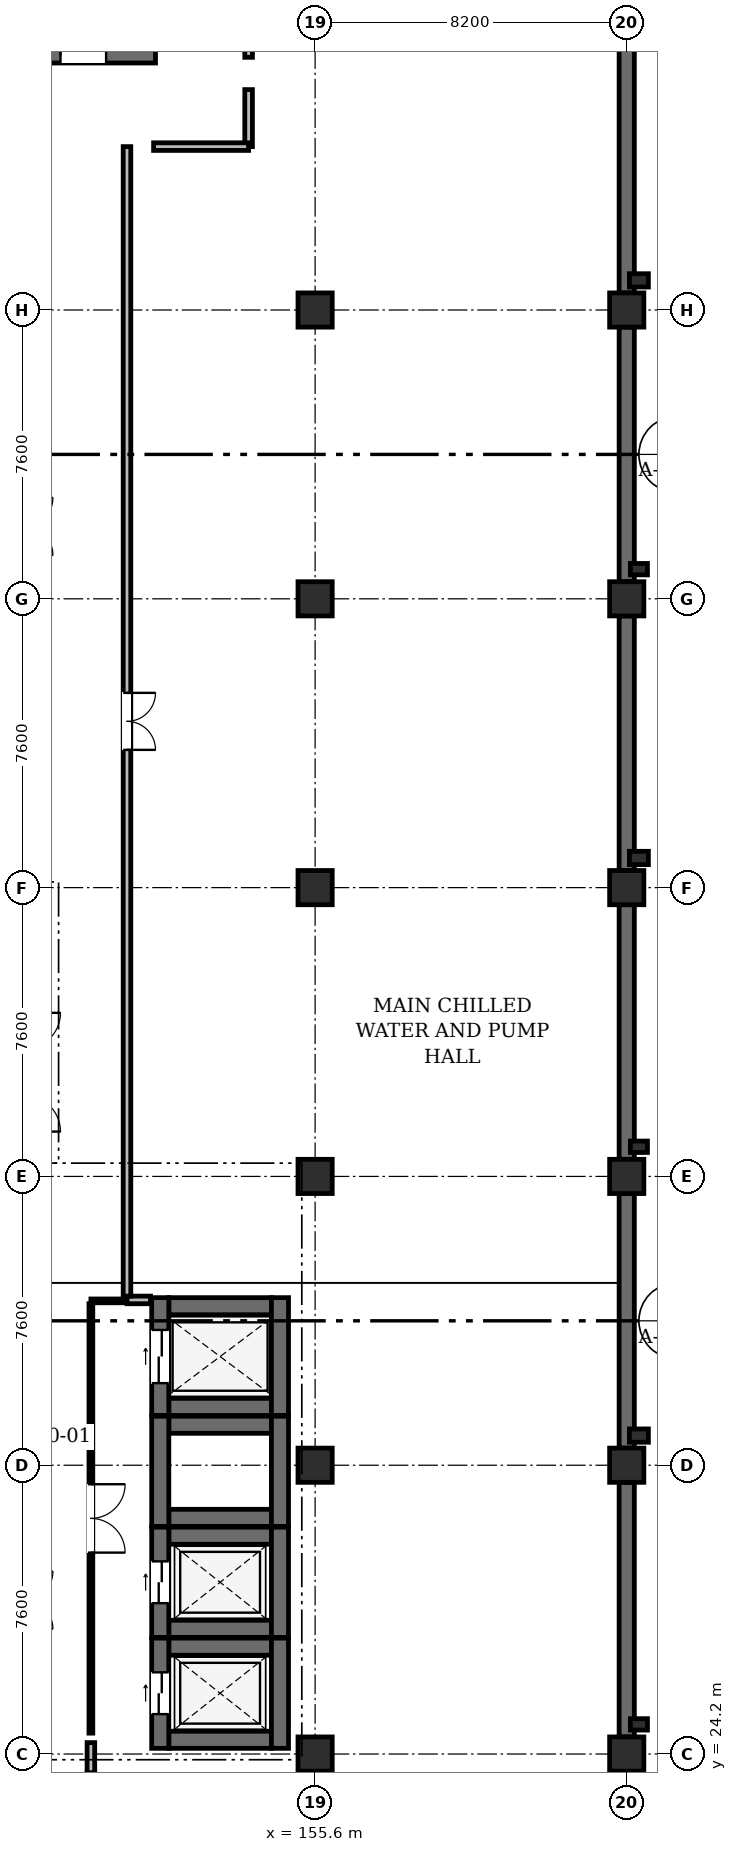
"""IFC4 building model, lengths in metres.
Left out: names, types, materials, properties, quantities, classifications, styles, units other than length and angle.
Written with IfcOpenShell. Run it as: python <this file> out.ifc"""

import sys

from ifc_helpers import new_model, si_unit, direction, frame, frame_2d, origin, origin_2d, place, context, subcontext, project, spatial, rectangle, extrude, element, fill, save


model = new_model("IFC4")
c1 = context("Model", 3, precision=1e-05, world=origin(), true_north=direction((0.0, 1.0)))
c2 = subcontext(c1, "Body", "Model", "MODEL_VIEW")
j1 = project(units=[si_unit("LENGTHUNIT", "METRE"), si_unit("PLANEANGLEUNIT", "RADIAN")], contexts=[c1])
p1 = place(None, origin())
s1 = spatial("IfcSite", under=j1, at=p1, CompositionType="ELEMENT")
p2 = place(p1, origin())
s2 = spatial("IfcBuilding", under=s1, at=p2, CompositionType="ELEMENT")
p3 = place(p2, frame((0.0, 0.0, -4.8)))
s3 = spatial("IfcBuildingStorey", under=s2, at=p3, CompositionType="ELEMENT", Elevation=-4.8)
for number, where, z_axis, x_axis in (
    (1, (155.6, 24.2, 0.0), (0.0, 0.0, 1.0), (1.0, 0.0, 0.0)),
    (2, (155.6, 31.8, 0.0), (0.0, 0.0, 1.0), (1.0, 0.0, 0.0)),
    (3, (155.6, 39.4, 0.0), (0.0, 0.0, 1.0), (1.0, 0.0, 0.0)),
    (4, (155.6, 47.0, 0.0), (0.0, 0.0, 1.0), (1.0, 0.0, 0.0)),
    (5, (155.6, 54.6, 0.0), (0.0, 0.0, 1.0), (1.0, 0.0, 0.0)),
    (6, (155.6, 62.2, 0.0), (0.0, 0.0, 1.0), (1.0, 0.0, 0.0)),
    (7, (163.8, 24.2, 0.0), (0.0, 0.0, 1.0), (1.0, 0.0, 0.0)),
    (8, (163.8, 31.8, 0.0), (0.0, 0.0, 1.0), (1.0, 0.0, 0.0)),
    (9, (163.8, 39.4, 0.0), (0.0, 0.0, 1.0), (1.0, 0.0, 0.0)),
    (10, (163.8, 47.0, 0.0), (0.0, 0.0, 1.0), (1.0, 0.0, 0.0)),
    (11, (163.8, 54.6, 0.0), (0.0, 0.0, 1.0), (1.0, 0.0, 0.0)),
    (12, (163.8, 62.2, 0.0), (0.0, 0.0, 1.0), (1.0, 0.0, 0.0)),
):
    element("IfcColumn", number, at=place(p3, frame(where, z_axis=z_axis, x_axis=x_axis)), inside=s3, PredefinedType="COLUMN", context=c2, shape_type="SweptSolid", body=[
        extrude(rectangle(XDim=0.9, YDim=0.9, at=origin_2d()), origin(), (0.0, 0.0, 1.0), 4.46),
    ])
p4 = place(p3, frame((164.12, 24.98, 0.0), z_axis=(0.0, 0.0, 1.0), x_axis=(1.0, 0.0, 0.0)))
e13 = element("IfcColumn", 13, at=p4, inside=s3, PredefinedType="PILASTER", context=c2, shape_type="SweptSolid", body=[
    extrude(rectangle(XDim=0.45, YDim=0.3, at=origin_2d()), origin(), (0.0, 0.0, 1.0), 4.565),
])
p5 = place(p3, frame((164.12, 32.58, 0.0), z_axis=(0.0, 0.0, 1.0), x_axis=(1.0, 0.0, 0.0)))
e14 = element("IfcColumn", 14, at=p5, inside=s3, PredefinedType="PILASTER", context=c2, shape_type="SweptSolid", body=[
    extrude(rectangle(XDim=0.5, YDim=0.35, at=origin_2d()), origin(), (0.0, 0.0, 1.0), 4.565),
])
p6 = place(p3, frame((164.12, 40.18, 0.0), z_axis=(0.0, 0.0, 1.0), x_axis=(1.0, 0.0, 0.0)))
e15 = element("IfcColumn", 15, at=p6, inside=s3, PredefinedType="PILASTER", context=c2, shape_type="SweptSolid", body=[
    extrude(rectangle(XDim=0.45, YDim=0.3, at=origin_2d()), origin(), (0.0, 0.0, 1.0), 4.565),
])
p7 = place(p3, frame((164.12, 47.78, 0.0), z_axis=(0.0, 0.0, 1.0), x_axis=(1.0, 0.0, 0.0)))
e16 = element("IfcColumn", 16, at=p7, inside=s3, PredefinedType="PILASTER", context=c2, shape_type="SweptSolid", body=[
    extrude(rectangle(XDim=0.5, YDim=0.35, at=origin_2d()), origin(), (0.0, 0.0, 1.0), 4.565),
])
p8 = place(p3, frame((164.12, 55.38, 0.0), z_axis=(0.0, 0.0, 1.0), x_axis=(1.0, 0.0, 0.0)))
e17 = element("IfcColumn", 17, at=p8, inside=s3, PredefinedType="PILASTER", context=c2, shape_type="SweptSolid", body=[
    extrude(rectangle(XDim=0.45, YDim=0.3, at=origin_2d()), origin(), (0.0, 0.0, 1.0), 4.565),
])
p9 = place(p3, frame((164.12, 62.98, 0.0), z_axis=(0.0, 0.0, 1.0), x_axis=(1.0, 0.0, 0.0)))
e18 = element("IfcColumn", 18, at=p9, inside=s3, PredefinedType="PILASTER", context=c2, shape_type="SweptSolid", body=[
    extrude(rectangle(XDim=0.5, YDim=0.35, at=origin_2d()), origin(), (0.0, 0.0, 1.0), 4.565),
])
p10 = place(p3, frame((163.8, 17.05, 0.0), z_axis=(0.0, 0.0, 1.0), x_axis=(0.0, 1.0, 0.0)))
e19 = element("IfcWall", 19, at=p10, inside=s3, PredefinedType="SOLIDWALL", context=c2, shape_type="SweptSolid", body=[
    extrude(rectangle(XDim=6.7, YDim=0.4, at=frame_2d((3.35, 0.0))), origin(), (0.0, 0.0, 1.0), 4.46),
])
p11 = place(p3, frame((163.8, 24.65, 0.0), z_axis=(0.0, 0.0, 1.0), x_axis=(0.0, 1.0, 0.0)))
e20 = element("IfcWall", 20, at=p11, inside=s3, PredefinedType="SOLIDWALL", context=c2, shape_type="SweptSolid", body=[
    extrude(rectangle(XDim=6.7, YDim=0.4, at=frame_2d((3.35, 0.0))), origin(), (0.0, 0.0, 1.0), 4.46),
])
for number, where, z_axis, x_axis in (
    (21, (163.8, 32.25, 0.0), (0.0, 0.0, 1.0), (0.0, 1.0, 0.0)),
    (22, (163.8, 39.85, 0.0), (0.0, 0.0, 1.0), (0.0, 1.0, 0.0)),
    (23, (163.8, 47.45, 0.0), (0.0, 0.0, 1.0), (0.0, 1.0, 0.0)),
    (24, (163.8, 55.05, 0.0), (0.0, 0.0, 1.0), (0.0, 1.0, 0.0)),
):
    element("IfcWall", number, at=place(p3, frame(where, z_axis=z_axis, x_axis=x_axis)), inside=s3, PredefinedType="SOLIDWALL", context=c2, shape_type="SweptSolid", body=[
        extrude(rectangle(XDim=6.7, YDim=0.4, at=frame_2d((3.35, 0.0))), origin(), (0.0, 0.0, 1.0), 4.46),
    ])
p12 = place(p3, frame((163.8, 62.65, 0.0), z_axis=(0.0, 0.0, 1.0), x_axis=(0.0, 1.0, 0.0)))
e25 = element("IfcWall", 25, at=p12, inside=s3, PredefinedType="SOLIDWALL", context=c2, shape_type="SweptSolid", body=[
    extrude(rectangle(XDim=6.775, YDim=0.4, at=frame_2d((3.388, 0.0))), origin(), (0.0, 0.0, 1.0), 4.46),
])
p13 = place(p3, frame((147.6, 68.9, 0.0), z_axis=(0.0, 0.0, 1.0), x_axis=(1.0, 0.0, 0.0)))
e26 = element("IfcWall", 26, at=p13, inside=s3, PredefinedType="SHEAR", context=c2, shape_type="SweptSolid", body=[
    extrude(rectangle(XDim=3.8, YDim=0.4, at=frame_2d((1.9, 0.0))), origin(), (0.0, 0.0, 1.0), 4.46),
])
p14 = place(p13, frame((1.3, 0.0, 0.0)))
e27 = element("IfcOpeningElement", 27, at=p14, cuts=e26, PredefinedType="OPENING", context=c2, shape_type="SweptSolid", body=[
    extrude(rectangle(XDim=1.2, YDim=2.2, at=frame_2d((0.6, 1.1))), frame((0.0, 0.212, 0.0), z_axis=(0.0, -1.0, 0.0), x_axis=(1.0, 0.0, 0.0)), (0.0, 0.0, 1.0), 0.424),
])
for number, where, z_axis, x_axis in (
    (28, (151.75, 24.575, 0.0), (0.0, 0.0, 1.0), (1.0, 0.0, 0.0)),
    (29, (151.75, 27.025, 0.0), (0.0, 0.0, 1.0), (1.0, 0.0, 0.0)),
):
    element("IfcWall", number, at=place(p3, frame(where, z_axis=z_axis, x_axis=x_axis)), inside=s3, PredefinedType="SHEAR", context=c2, shape_type="SweptSolid", body=[
        extrude(rectangle(XDim=2.7, YDim=0.45, at=frame_2d((1.35, 0.0))), origin(), (0.0, 0.0, 1.0), 4.46),
    ])
p15 = place(p3, frame((151.525, 24.35, 0.0), z_axis=(0.0, 0.0, 1.0), x_axis=(0.0, 1.0, 0.0)))
e30 = element("IfcWall", 30, at=p15, inside=s3, PredefinedType="SHEAR", context=c2, shape_type="SweptSolid", body=[
    extrude(rectangle(XDim=2.9, YDim=0.45, at=frame_2d((1.45, 0.0))), origin(), (0.0, 0.0, 1.0), 4.46),
])
p16 = place(p15, frame((0.9, 0.0, 0.0)))
e31 = element("IfcOpeningElement", 31, at=p16, cuts=e30, PredefinedType="OPENING", context=c2, shape_type="SweptSolid", body=[
    extrude(rectangle(XDim=1.1, YDim=2.2, at=frame_2d((0.55, 1.1))), frame((0.0, 0.237, 0.0), z_axis=(0.0, -1.0, 0.0), x_axis=(1.0, 0.0, 0.0)), (0.0, 0.0, 1.0), 0.474),
])
p17 = place(p3, frame((154.675, 24.35, 0.0), z_axis=(0.0, 0.0, 1.0), x_axis=(0.0, 1.0, 0.0)))
e32 = element("IfcWall", 32, at=p17, inside=s3, PredefinedType="SHEAR", context=c2, shape_type="SweptSolid", body=[
    extrude(rectangle(XDim=2.9, YDim=0.45, at=frame_2d((1.45, 0.0))), origin(), (0.0, 0.0, 1.0), 4.46),
])
for number, where, z_axis, x_axis in (
    (33, (151.75, 27.495, 0.0), (0.0, 0.0, 1.0), (1.0, 0.0, 0.0)),
    (34, (151.75, 29.945, 0.0), (0.0, 0.0, 1.0), (1.0, 0.0, 0.0)),
):
    element("IfcWall", number, at=place(p3, frame(where, z_axis=z_axis, x_axis=x_axis)), inside=s3, PredefinedType="SHEAR", context=c2, shape_type="SweptSolid", body=[
        extrude(rectangle(XDim=2.7, YDim=0.45, at=frame_2d((1.35, 0.0))), origin(), (0.0, 0.0, 1.0), 4.46),
    ])
p18 = place(p3, frame((151.525, 27.27, 0.0), z_axis=(0.0, 0.0, 1.0), x_axis=(0.0, 1.0, 0.0)))
e35 = element("IfcWall", 35, at=p18, inside=s3, PredefinedType="SHEAR", context=c2, shape_type="SweptSolid", body=[
    extrude(rectangle(XDim=2.9, YDim=0.45, at=frame_2d((1.45, 0.0))), origin(), (0.0, 0.0, 1.0), 4.46),
])
p19 = place(p18, frame((0.9, 0.0, 0.0)))
e36 = element("IfcOpeningElement", 36, at=p19, cuts=e35, PredefinedType="OPENING", context=c2, shape_type="SweptSolid", body=[
    extrude(rectangle(XDim=1.1, YDim=2.2, at=frame_2d((0.55, 1.1))), frame((0.0, 0.237, 0.0), z_axis=(0.0, -1.0, 0.0), x_axis=(1.0, 0.0, 0.0)), (0.0, 0.0, 1.0), 0.474),
])
p20 = place(p3, frame((154.675, 27.27, 0.0), z_axis=(0.0, 0.0, 1.0), x_axis=(0.0, 1.0, 0.0)))
e37 = element("IfcWall", 37, at=p20, inside=s3, PredefinedType="SHEAR", context=c2, shape_type="SweptSolid", body=[
    extrude(rectangle(XDim=2.9, YDim=0.45, at=frame_2d((1.45, 0.0))), origin(), (0.0, 0.0, 1.0), 4.46),
])
for number, where, z_axis, x_axis in (
    (38, (151.75, 30.415, 0.0), (0.0, 0.0, 1.0), (1.0, 0.0, 0.0)),
    (39, (151.75, 32.865, 0.0), (0.0, 0.0, 1.0), (1.0, 0.0, 0.0)),
):
    element("IfcWall", number, at=place(p3, frame(where, z_axis=z_axis, x_axis=x_axis)), inside=s3, PredefinedType="SHEAR", context=c2, shape_type="SweptSolid", body=[
        extrude(rectangle(XDim=2.7, YDim=0.45, at=frame_2d((1.35, 0.0))), origin(), (0.0, 0.0, 1.0), 4.46),
    ])
for number, where, z_axis, x_axis in (
    (40, (151.525, 30.19, 0.0), (0.0, 0.0, 1.0), (0.0, 1.0, 0.0)),
    (41, (154.675, 30.19, 0.0), (0.0, 0.0, 1.0), (0.0, 1.0, 0.0)),
):
    element("IfcWall", number, at=place(p3, frame(where, z_axis=z_axis, x_axis=x_axis)), inside=s3, PredefinedType="SHEAR", context=c2, shape_type="SweptSolid", body=[
        extrude(rectangle(XDim=2.9, YDim=0.45, at=frame_2d((1.45, 0.0))), origin(), (0.0, 0.0, 1.0), 4.46),
    ])
for number, where, z_axis, x_axis in (
    (42, (151.75, 33.335, 0.0), (0.0, 0.0, 1.0), (1.0, 0.0, 0.0)),
    (43, (151.75, 35.985, 0.0), (0.0, 0.0, 1.0), (1.0, 0.0, 0.0)),
):
    element("IfcWall", number, at=place(p3, frame(where, z_axis=z_axis, x_axis=x_axis)), inside=s3, PredefinedType="SHEAR", context=c2, shape_type="SweptSolid", body=[
        extrude(rectangle(XDim=2.7, YDim=0.45, at=frame_2d((1.35, 0.0))), origin(), (0.0, 0.0, 1.0), 4.46),
    ])
p21 = place(p3, frame((151.525, 33.11, 0.0), z_axis=(0.0, 0.0, 1.0), x_axis=(0.0, 1.0, 0.0)))
e44 = element("IfcWall", 44, at=p21, inside=s3, PredefinedType="SHEAR", context=c2, shape_type="SweptSolid", body=[
    extrude(rectangle(XDim=3.1, YDim=0.45, at=frame_2d((1.55, 0.0))), origin(), (0.0, 0.0, 1.0), 4.46),
])
p22 = place(p21, frame((0.85, 0.0, 0.0)))
e45 = element("IfcOpeningElement", 45, at=p22, cuts=e44, PredefinedType="OPENING", context=c2, shape_type="SweptSolid", body=[
    extrude(rectangle(XDim=1.4, YDim=2.3, at=frame_2d((0.7, 1.15))), frame((0.0, 0.237, 0.0), z_axis=(0.0, -1.0, 0.0), x_axis=(1.0, 0.0, 0.0)), (0.0, 0.0, 1.0), 0.474),
])
p23 = place(p3, frame((154.675, 33.11, 0.0), z_axis=(0.0, 0.0, 1.0), x_axis=(0.0, 1.0, 0.0)))
e46 = element("IfcWall", 46, at=p23, inside=s3, PredefinedType="SHEAR", context=c2, shape_type="SweptSolid", body=[
    extrude(rectangle(XDim=3.1, YDim=0.45, at=frame_2d((1.55, 0.0))), origin(), (0.0, 0.0, 1.0), 4.46),
])
p24 = place(p3, frame((149.7, 24.75, 0.0), z_axis=(0.0, 0.0, 1.0), x_axis=(0.0, 1.0, 0.0)))
e47 = element("IfcWall", 47, at=p24, inside=s3, PredefinedType="PARTITIONING", context=c2, shape_type="SweptSolid", body=[
    extrude(rectangle(XDim=11.3, YDim=0.1, at=frame_2d((5.65, 0.0))), origin(), (0.0, 0.0, 1.0), 4.405),
])
p25 = place(p24, frame((4.75, 0.0, 0.0)))
e48 = element("IfcOpeningElement", 48, at=p25, cuts=e47, PredefinedType="OPENING", context=c2, shape_type="SweptSolid", body=[
    extrude(rectangle(XDim=1.8, YDim=2.4, at=frame_2d((0.9, 1.2))), frame((0.0, 0.062, 0.0), z_axis=(0.0, -1.0, 0.0), x_axis=(1.0, 0.0, 0.0)), (0.0, 0.0, 1.0), 0.124),
])
p26 = place(p3, frame((149.7, 36.125, 0.0), z_axis=(0.0, 0.0, 1.0), x_axis=(1.0, 0.0, 0.0)))
e49 = element("IfcWall", 49, at=p26, inside=s3, PredefinedType="PARTITIONING", context=c2, shape_type="SweptSolid", body=[
    extrude(rectangle(XDim=0.95, YDim=0.1, at=frame_2d((0.475, 0.0))), origin(), (0.0, 0.0, 1.0), 4.405),
])
p27 = place(p3, frame((150.65, 36.15, 0.0), z_axis=(0.0, 0.0, 1.0), x_axis=(1.0, 0.0, 0.0)))
e50 = element("IfcWall", 50, at=p27, inside=s3, PredefinedType="PARTITIONING", context=c2, shape_type="SweptSolid", body=[
    extrude(rectangle(XDim=0.62, YDim=0.2, at=frame_2d((0.31, 0.0))), origin(), (0.0, 0.0, 1.0), 4.405),
])
p28 = place(p3, frame((149.7, 24.5, 0.0), z_axis=(0.0, 0.0, 1.0), x_axis=(0.0, -1.0, 0.0)))
e51 = element("IfcWall", 51, at=p28, inside=s3, PredefinedType="PARTITIONING", context=c2, shape_type="SweptSolid", body=[
    extrude(rectangle(XDim=0.8, YDim=0.2, at=frame_2d((0.4, 0.0))), origin(), (0.0, 0.0, 1.0), 4.405),
])
p29 = place(p3, frame((153.85, 68.0, 0.0), z_axis=(0.0, 0.0, 1.0), x_axis=(0.0, -1.0, 0.0)))
e52 = element("IfcWall", 52, at=p29, inside=s3, PredefinedType="PARTITIONING", context=c2, shape_type="SweptSolid", body=[
    extrude(rectangle(XDim=1.5, YDim=0.2, at=frame_2d((0.75, 0.0))), origin(), (0.0, 0.0, 1.0), 4.405),
])
p30 = place(p3, frame((153.85, 66.5, 0.0), z_axis=(0.0, 0.0, 1.0), x_axis=(-1.0, 0.0, 0.0)))
e53 = element("IfcWall", 53, at=p30, inside=s3, PredefinedType="PARTITIONING", context=c2, shape_type="SweptSolid", body=[
    extrude(rectangle(XDim=2.5, YDim=0.2, at=frame_2d((1.25, 0.0))), origin(), (0.0, 0.0, 1.0), 4.405),
])
p31 = place(p3, frame((150.65, 66.5, 0.0), z_axis=(0.0, 0.0, 1.0), x_axis=(0.0, -1.0, 0.0)))
e54 = element("IfcWall", 54, at=p31, inside=s3, PredefinedType="PARTITIONING", context=c2, shape_type="SweptSolid", body=[
    extrude(rectangle(XDim=30.25, YDim=0.2, at=frame_2d((15.125, 0.0))), origin(), (0.0, 0.0, 1.0), 4.405),
])
p32 = place(p31, frame((14.375, 0.0, 0.0)))
e55 = element("IfcOpeningElement", 55, at=p32, cuts=e54, PredefinedType="OPENING", context=c2, shape_type="SweptSolid", body=[
    extrude(rectangle(XDim=1.5, YDim=2.2, at=frame_2d((0.75, 1.1))), frame((0.0, 0.112, 0.0), z_axis=(0.0, -1.0, 0.0), x_axis=(1.0, 0.0, 0.0)), (0.0, 0.0, 1.0), 0.224),
])
p33 = place(p3, frame((153.85, 99.9, 0.0), z_axis=(0.0, 0.0, 1.0), x_axis=(0.0, -1.0, 0.0)))
e56 = element("IfcWall", 56, at=p33, inside=s3, PredefinedType="PARTITIONING", context=c2, shape_type="SweptSolid", body=[
    extrude(rectangle(XDim=31.05, YDim=0.2, at=frame_2d((15.525, 0.0))), origin(), (0.0, 0.0, 1.0), 4.405),
])
p34 = place(p33, frame((14.775, 0.0, 0.0)))
e57 = element("IfcOpeningElement", 57, at=p34, cuts=e56, PredefinedType="OPENING", context=c2, shape_type="SweptSolid", body=[
    extrude(rectangle(XDim=1.5, YDim=2.2, at=frame_2d((0.75, 1.1))), frame((0.0, 0.112, 0.0), z_axis=(0.0, -1.0, 0.0), x_axis=(1.0, 0.0, 0.0)), (0.0, 0.0, 1.0), 0.224),
])
p35 = place(p14, origin())
e58 = element("IfcDoor", 58, at=p35, inside=s3, OperationType="SINGLE_SWING_LEFT", PredefinedType="DOOR", context=c2, shape_type="SweptSolid", body=[
    extrude(rectangle(XDim=1.2, YDim=2.2, at=frame_2d((0.6, 1.1))), frame((0.0, 0.025, 0.0), z_axis=(0.0, -1.0, 0.0), x_axis=(1.0, 0.0, 0.0)), (0.0, 0.0, 1.0), 0.05),
])
fill(e27, e58)
p36 = place(p16, origin())
e59 = element("IfcDoor", 59, at=p36, inside=s3, OperationType="DOUBLE_DOOR_SLIDING", PredefinedType="DOOR", context=c2, shape_type="SweptSolid", body=[
    extrude(rectangle(XDim=1.1, YDim=2.2, at=frame_2d((0.55, 1.1))), frame((0.0, 0.025, 0.0), z_axis=(0.0, -1.0, 0.0), x_axis=(1.0, 0.0, 0.0)), (0.0, 0.0, 1.0), 0.05),
])
fill(e31, e59)
p37 = place(p19, origin())
e60 = element("IfcDoor", 60, at=p37, inside=s3, OperationType="DOUBLE_DOOR_SLIDING", PredefinedType="DOOR", context=c2, shape_type="SweptSolid", body=[
    extrude(rectangle(XDim=1.1, YDim=2.2, at=frame_2d((0.55, 1.1))), frame((0.0, 0.025, 0.0), z_axis=(0.0, -1.0, 0.0), x_axis=(1.0, 0.0, 0.0)), (0.0, 0.0, 1.0), 0.05),
])
fill(e36, e60)
p38 = place(p22, origin())
e61 = element("IfcDoor", 61, at=p38, inside=s3, OperationType="DOUBLE_DOOR_SLIDING", PredefinedType="DOOR", context=c2, shape_type="SweptSolid", body=[
    extrude(rectangle(XDim=1.4, YDim=2.3, at=frame_2d((0.7, 1.15))), frame((0.0, 0.025, 0.0), z_axis=(0.0, -1.0, 0.0), x_axis=(1.0, 0.0, 0.0)), (0.0, 0.0, 1.0), 0.05),
])
fill(e45, e61)
p39 = place(p25, frame((1.8, 0.0, 0.0), z_axis=(0.0, 0.0, 1.0), x_axis=(-1.0, 0.0, 0.0)))
e62 = element("IfcDoor", 62, at=p39, inside=s3, OperationType="DOUBLE_DOOR_SINGLE_SWING", PredefinedType="DOOR", context=c2, shape_type="SweptSolid", body=[
    extrude(rectangle(XDim=1.8, YDim=2.4, at=frame_2d((0.9, 1.2))), frame((0.0, 0.025, 0.0), z_axis=(0.0, -1.0, 0.0), x_axis=(1.0, 0.0, 0.0)), (0.0, 0.0, 1.0), 0.05),
])
fill(e48, e62)
p40 = place(p32, origin())
e63 = element("IfcDoor", 63, at=p40, inside=s3, OperationType="DOUBLE_DOOR_SINGLE_SWING", PredefinedType="DOOR", context=c2, shape_type="SweptSolid", body=[
    extrude(rectangle(XDim=1.5, YDim=2.2, at=frame_2d((0.75, 1.1))), frame((0.0, 0.025, 0.0), z_axis=(0.0, -1.0, 0.0), x_axis=(1.0, 0.0, 0.0)), (0.0, 0.0, 1.0), 0.05),
])
fill(e55, e63)
save(model, sys.argv[1])
